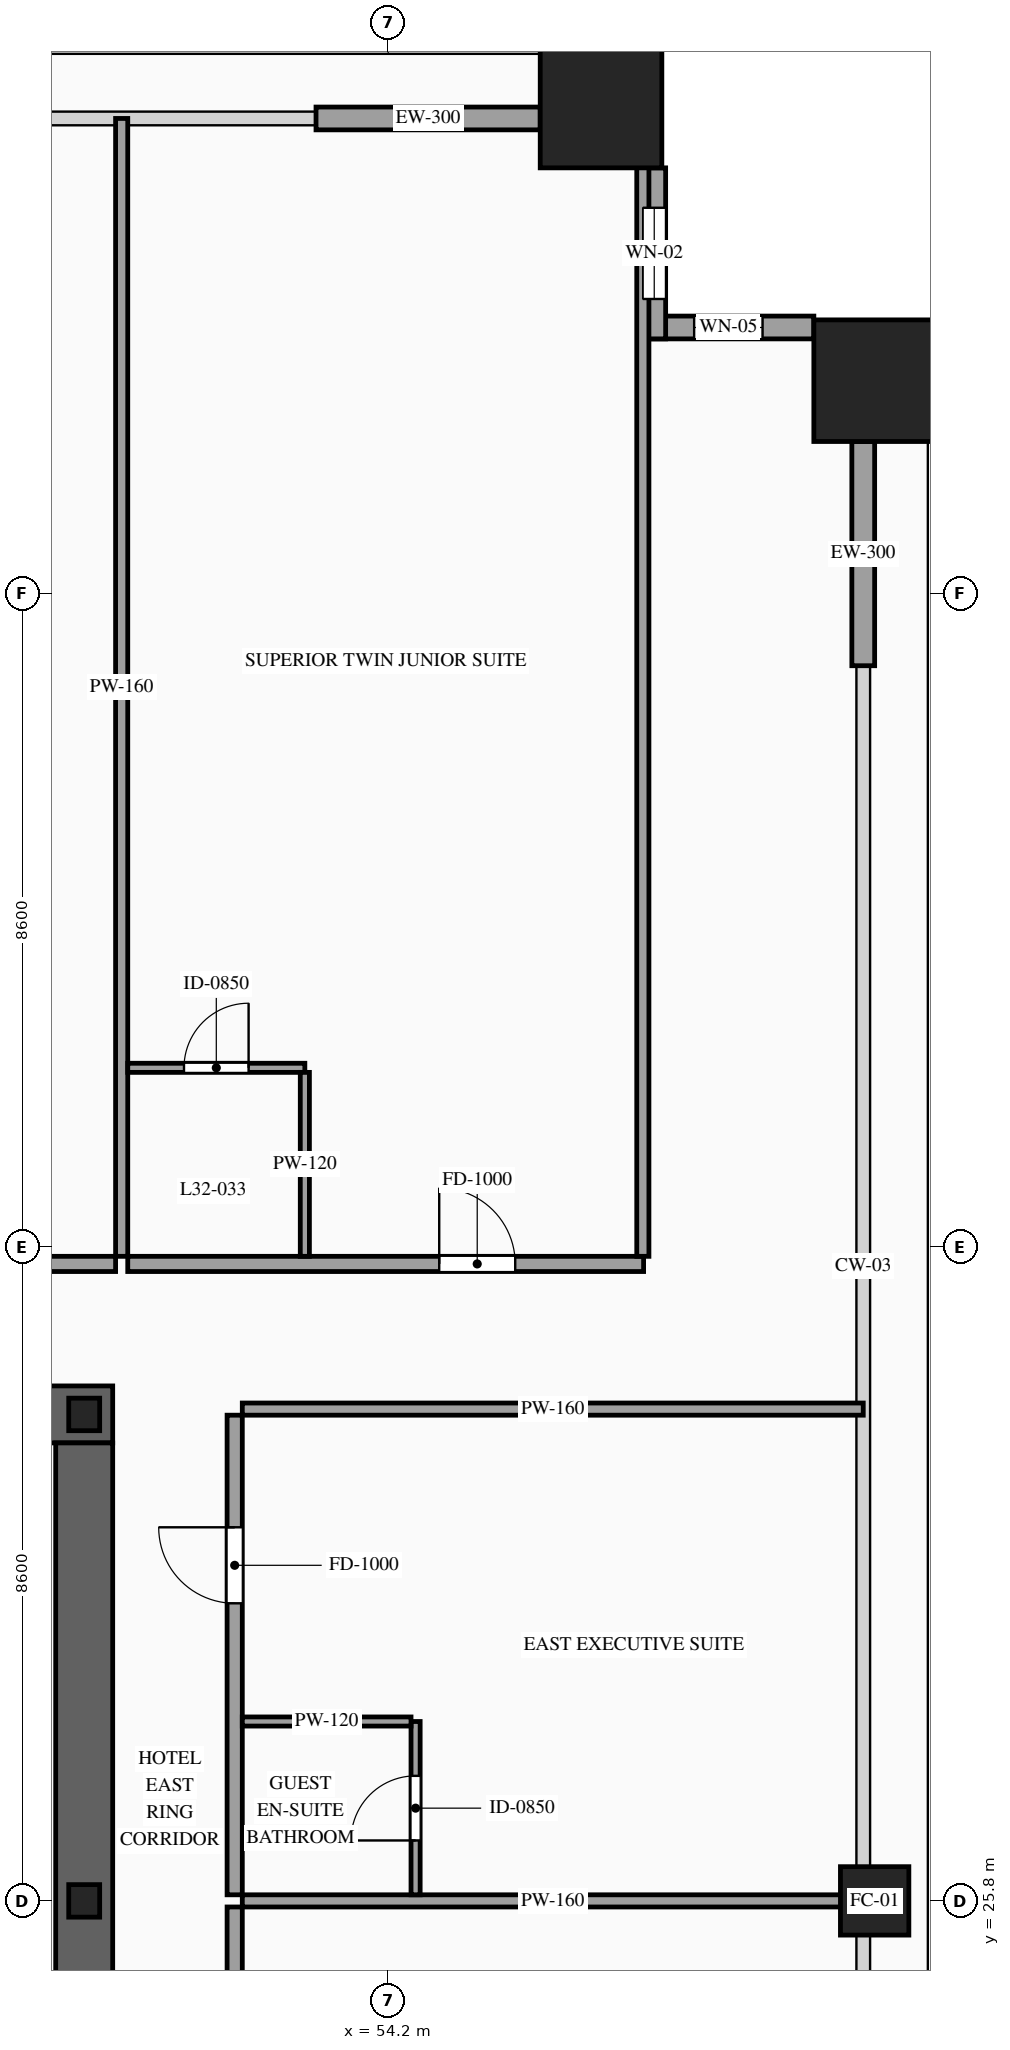
"""IFC4 building model, lengths in metres.
Left out: names, types, materials, properties, quantities, classifications, styles, units other than length and angle.
Written with IfcOpenShell. Run it as: python <this file> out.ifc"""

import sys

from ifc_helpers import new_model, si_unit, direction, frame, frame_2d, origin, origin_2d, place, context, subcontext, project, spatial, rectangle, hollow_rectangle, i_section, extrude, source, transform, mapped, element, fill, save


model = new_model("IFC4")
c1 = context("Model", 3, precision=1e-05, world=origin(), true_north=direction((0.0, 1.0)))
c2 = subcontext(c1, "Body", "Model", "MODEL_VIEW")
j1 = project(units=[si_unit("LENGTHUNIT", "METRE"), si_unit("PLANEANGLEUNIT", "RADIAN")], contexts=[c1])
p1 = place(None, origin())
s1 = spatial("IfcSite", under=j1, at=p1, CompositionType="ELEMENT")
p2 = place(p1, origin())
s2 = spatial("IfcBuilding", under=s1, at=p2, CompositionType="ELEMENT")
p3 = place(p2, frame((0.0, 0.0, 122.6)))
s3 = spatial("IfcBuildingStorey", under=s2, at=p3, CompositionType="ELEMENT", Elevation=122.6)
p4 = place(p3, frame((23.425, 32.2, 0.0), z_axis=(0.0, 0.0, 1.0), x_axis=(1.0, 0.0, 0.0)))
e1 = element("IfcWall", 1, at=p4, inside=s3, PredefinedType="SHEAR", context=c2, shape_type="SweptSolid", body=[
    extrude(rectangle(XDim=27.15, YDim=0.75, at=frame_2d((13.575, 0.0))), origin(), (0.0, 0.0, 1.0), 3.6),
])
p5 = place(p4, frame((4.645, 0.0, 0.0)))
e2 = element("IfcOpeningElement", 2, at=p5, cuts=e1, PredefinedType="OPENING", context=c2, shape_type="SweptSolid", body=[
    extrude(rectangle(XDim=0.9, YDim=2.15, at=frame_2d((0.45, 1.075))), frame((0.0, 0.39, 0.0), z_axis=(0.0, -1.0, 0.0), x_axis=(1.0, 0.0, 0.0)), (0.0, 0.0, 1.0), 0.78),
])
p6 = place(p4, frame((9.925, 0.0, 0.0)))
e3 = element("IfcOpeningElement", 3, at=p6, cuts=e1, PredefinedType="OPENING", context=c2, shape_type="SweptSolid", body=[
    extrude(rectangle(XDim=1.1, YDim=2.2, at=frame_2d((0.55, 1.1))), frame((0.0, 0.39, 0.0), z_axis=(0.0, -1.0, 0.0), x_axis=(1.0, 0.0, 0.0)), (0.0, 0.0, 1.0), 0.78),
])
p7 = place(p4, frame((15.775, 0.0, 0.0)))
e4 = element("IfcOpeningElement", 4, at=p7, cuts=e1, PredefinedType="OPENING", context=c2, shape_type="SweptSolid", body=[
    extrude(rectangle(XDim=1.1, YDim=2.2, at=frame_2d((0.55, 1.1))), frame((0.0, 0.39, 0.0), z_axis=(0.0, -1.0, 0.0), x_axis=(1.0, 0.0, 0.0)), (0.0, 0.0, 1.0), 0.78),
])
m1 = source(origin(), c2, "Body", "SweptSolid", [
    extrude(rectangle(XDim=12.05, YDim=0.75, at=frame_2d((6.025, 0.0))), origin(), (0.0, 0.0, 1.0), 3.6),
])
p8 = place(p3, frame((50.2, 19.775, 0.0), z_axis=(0.0, 0.0, 1.0), x_axis=(0.0, 1.0, 0.0)))
e5 = element("IfcWall", 5, at=p8, inside=s3, PredefinedType="SHEAR", context=c2, shape_type="MappedRepresentation", body=[
    mapped(m1, transform((0.0, 0.0, 0.0), scale=1.0)),
])
m2 = source(origin(), c2, "Body", "SweptSolid", [
    extrude(i_section(OverallWidth=0.407, OverallDepth=0.428, WebThickness=0.02, FlangeThickness=0.035, at=origin_2d()), origin(), (0.0, 0.0, 1.0), 3.6),
])
for number, where, z_axis, x_axis in (
    (6, (50.2, 25.8, 0.0), (0.0, 0.0, 1.0), (1.0, 0.0, 0.0)),
    (7, (50.2, 32.2, 0.0), (0.0, 0.0, 1.0), (1.0, 0.0, 0.0)),
):
    element("IfcColumn", number, at=place(p3, frame(where, z_axis=z_axis, x_axis=x_axis)), inside=s3, PredefinedType="COLUMN", context=c2, shape_type="MappedRepresentation", body=[
        mapped(m2, transform((0.0, 0.0, 0.0), scale=1.0)),
    ])
m3 = source(origin(), c2, "Body", "SweptSolid", [
    extrude(hollow_rectangle(XDim=1.6, YDim=1.6, WallThickness=0.07, at=origin_2d()), origin(), (0.0, 0.0, 1.0), 3.6),
])
p9 = place(p3, frame((57.0, 49.4, 0.0), z_axis=(0.0, 0.0, 1.0), x_axis=(1.0, 0.0, 0.0)))
e8 = element("IfcColumn", 8, at=p9, inside=s3, PredefinedType="COLUMN", context=c2, shape_type="MappedRepresentation", body=[
    mapped(m3, transform((0.0, 0.0, 0.0), scale=1.0)),
])
m4 = source(origin(), c2, "Body", "SweptSolid", [
    extrude(hollow_rectangle(XDim=0.9, YDim=0.9, WallThickness=0.042, at=origin_2d()), origin(), (0.0, 0.0, 1.0), 3.6),
])
p10 = place(p3, frame((60.6, 25.8, 0.0), z_axis=(0.0, 0.0, 1.0), x_axis=(1.0, 0.0, 0.0)))
e9 = element("IfcColumn", 9, at=p10, inside=s3, PredefinedType="COLUMN", context=c2, shape_type="MappedRepresentation", body=[
    mapped(m4, transform((0.0, 0.0, 0.0), scale=1.0)),
])
p11 = place(p3, frame((60.6, 45.8, 0.0), z_axis=(0.0, 0.0, 1.0), x_axis=(1.0, 0.0, 0.0)))
e10 = element("IfcColumn", 10, at=p11, inside=s3, PredefinedType="COLUMN", context=c2, shape_type="MappedRepresentation", body=[
    mapped(m3, transform((0.0, 0.0, 0.0), scale=1.0)),
])
p12 = place(p3, frame((59.8, 46.5, 0.0), z_axis=(0.0, 0.0, 1.0), x_axis=(-1.0, 0.0, 0.0)))
e11 = element("IfcWall", 11, at=p12, inside=s3, PredefinedType="SOLIDWALL", context=c2, shape_type="SweptSolid", body=[
    extrude(rectangle(XDim=2.25, YDim=0.3, at=frame_2d((1.125, 0.0))), origin(), (0.0, 0.0, 1.0), 3.38),
])
p13 = place(p12, frame((0.675, 0.0, 0.85)))
e12 = element("IfcOpeningElement", 12, at=p13, cuts=e11, PredefinedType="OPENING", context=c2, shape_type="SweptSolid", body=[
    extrude(rectangle(XDim=0.9, YDim=1.5, at=frame_2d((0.45, 0.75))), frame((0.0, 0.165, 0.0), z_axis=(0.0, -1.0, 0.0), x_axis=(1.0, 0.0, 0.0)), (0.0, 0.0, 1.0), 0.33),
])
p14 = place(p3, frame((57.7, 46.35, 0.0), z_axis=(0.0, 0.0, 1.0), x_axis=(0.0, 1.0, 0.0)))
e13 = element("IfcWall", 13, at=p14, inside=s3, PredefinedType="SOLIDWALL", context=c2, shape_type="SweptSolid", body=[
    extrude(rectangle(XDim=2.25, YDim=0.3, at=frame_2d((1.125, 0.0))), origin(), (0.0, 0.0, 1.0), 3.38),
])
p15 = place(p14, frame((0.525, 0.0, 0.85)))
e14 = element("IfcOpeningElement", 14, at=p15, cuts=e13, PredefinedType="OPENING", context=c2, shape_type="SweptSolid", body=[
    extrude(rectangle(XDim=1.2, YDim=2.1, at=frame_2d((0.6, 1.05))), frame((0.0, 0.165, 0.0), z_axis=(0.0, -1.0, 0.0), x_axis=(1.0, 0.0, 0.0)), (0.0, 0.0, 1.0), 0.33),
])
m5 = source(origin(), c2, "Body", "SweptSolid", [
    extrude(rectangle(XDim=2.95, YDim=0.3, at=frame_2d((1.475, 0.0))), origin(), (0.0, 0.0, 1.0), 2.775),
])
for number, where, z_axis, x_axis in (
    (15, (53.25, 49.25, 0.0), (0.0, 0.0, 1.0), (1.0, 0.0, 0.0)),
    (16, (60.45, 42.05, 0.0), (0.0, 0.0, 1.0), (0.0, 1.0, 0.0)),
):
    element("IfcWall", number, at=place(p3, frame(where, z_axis=z_axis, x_axis=x_axis)), inside=s3, PredefinedType="SOLIDWALL", context=c2, shape_type="MappedRepresentation", body=[
        mapped(m5, transform((0.0, 0.0, 0.0), scale=1.0)),
    ])
p16 = place(p3, frame((38.93, 34.18, 0.0), z_axis=(0.0, 0.0, 1.0), x_axis=(1.0, 0.0, 0.0)))
e17 = element("IfcWall", 17, at=p16, inside=s3, PredefinedType="PARTITIONING", context=c2, shape_type="SweptSolid", body=[
    extrude(rectangle(XDim=11.683, YDim=0.2, at=frame_2d((5.842, 0.0))), origin(), (0.0, 0.0, 1.0), 3.38),
])
p17 = place(p16, frame((6.547, 0.0, 0.0)))
e18 = element("IfcOpeningElement", 18, at=p17, cuts=e17, PredefinedType="OPENING", context=c2, shape_type="SweptSolid", body=[
    extrude(rectangle(XDim=1.0, YDim=2.2, at=frame_2d((0.5, 1.1))), frame((0.0, 0.115, 0.0), z_axis=(0.0, -1.0, 0.0), x_axis=(1.0, 0.0, 0.0)), (0.0, 0.0, 1.0), 0.23),
])
m6 = source(origin(), c2, "Body", "SweptSolid", [
    extrude(rectangle(XDim=14.97, YDim=0.16, at=frame_2d((7.485, 0.0))), origin(), (0.0, 0.0, 1.0), 3.38),
])
p18 = place(p3, frame((50.693, 34.28, 0.0), z_axis=(0.0, 0.0, 1.0), x_axis=(0.0, 1.0, 0.0)))
e19 = element("IfcWall", 19, at=p18, inside=s3, PredefinedType="PARTITIONING", context=c2, shape_type="MappedRepresentation", body=[
    mapped(m6, transform((0.0, 0.0, 0.0), scale=1.0)),
])
p19 = place(p3, frame((50.773, 34.18, 0.0), z_axis=(0.0, 0.0, 1.0), x_axis=(1.0, 0.0, 0.0)))
e20 = element("IfcWall", 20, at=p19, inside=s3, PredefinedType="PARTITIONING", context=c2, shape_type="SweptSolid", body=[
    extrude(rectangle(XDim=6.787, YDim=0.2, at=frame_2d((3.394, 0.0))), origin(), (0.0, 0.0, 1.0), 3.38),
])
p20 = place(p19, frame((4.098, 0.0, 0.0)))
e21 = element("IfcOpeningElement", 21, at=p20, cuts=e20, PredefinedType="OPENING", context=c2, shape_type="SweptSolid", body=[
    extrude(rectangle(XDim=1.0, YDim=2.2, at=frame_2d((0.5, 1.1))), frame((0.0, 0.115, 0.0), z_axis=(0.0, -1.0, 0.0), x_axis=(1.0, 0.0, 0.0)), (0.0, 0.0, 1.0), 0.23),
])
m7 = source(origin(), c2, "Body", "SweptSolid", [
    extrude(rectangle(XDim=14.82, YDim=0.16, at=frame_2d((7.41, 0.0))), origin(), (0.0, 0.0, 1.0), 3.38),
])
p21 = place(p3, frame((57.55, 34.28, 0.0), z_axis=(0.0, 0.0, 1.0), x_axis=(0.0, 1.0, 0.0)))
e22 = element("IfcWall", 22, at=p21, inside=s3, PredefinedType="PARTITIONING", context=c2, shape_type="MappedRepresentation", body=[
    mapped(m7, transform((0.0, 0.0, 0.0), scale=1.0)),
])
p22 = place(p3, frame((50.773, 36.76, 0.0), z_axis=(0.0, 0.0, 1.0), x_axis=(1.0, 0.0, 0.0)))
e23 = element("IfcWall", 23, at=p22, inside=s3, PredefinedType="PARTITIONING", context=c2, shape_type="SweptSolid", body=[
    extrude(rectangle(XDim=2.33, YDim=0.12, at=frame_2d((1.165, 0.0))), origin(), (0.0, 0.0, 1.0), 3.38),
])
p23 = place(p22, frame((0.74, 0.0, 0.0)))
e24 = element("IfcOpeningElement", 24, at=p23, cuts=e23, PredefinedType="OPENING", context=c2, shape_type="SweptSolid", body=[
    extrude(rectangle(XDim=0.85, YDim=2.1, at=frame_2d((0.425, 1.05))), frame((0.0, 0.075, 0.0), z_axis=(0.0, -1.0, 0.0), x_axis=(1.0, 0.0, 0.0)), (0.0, 0.0, 1.0), 0.15),
])
m8 = source(origin(), c2, "Body", "SweptSolid", [
    extrude(rectangle(XDim=2.42, YDim=0.12, at=frame_2d((1.21, 0.0))), origin(), (0.0, 0.0, 1.0), 3.38),
])
p24 = place(p3, frame((53.103, 34.28, 0.0), z_axis=(0.0, 0.0, 1.0), x_axis=(0.0, 1.0, 0.0)))
e25 = element("IfcWall", 25, at=p24, inside=s3, PredefinedType="PARTITIONING", context=c2, shape_type="MappedRepresentation", body=[
    mapped(m8, transform((0.0, 0.0, 0.0), scale=1.0)),
])
p25 = place(p3, frame((52.18, 19.41, 0.0), z_axis=(0.0, 0.0, 1.0), x_axis=(0.0, 1.0, 0.0)))
e26 = element("IfcWall", 26, at=p25, inside=s3, PredefinedType="PARTITIONING", context=c2, shape_type="SweptSolid", body=[
    extrude(rectangle(XDim=6.31, YDim=0.2, at=frame_2d((3.155, 0.0))), origin(), (0.0, 0.0, 1.0), 3.38),
])
p26 = place(p25, frame((3.835, 0.0, 0.0)))
e27 = element("IfcOpeningElement", 27, at=p26, cuts=e26, PredefinedType="OPENING", context=c2, shape_type="SweptSolid", body=[
    extrude(rectangle(XDim=1.0, YDim=2.2, at=frame_2d((0.5, 1.1))), frame((0.0, 0.115, 0.0), z_axis=(0.0, -1.0, 0.0), x_axis=(1.0, 0.0, 0.0)), (0.0, 0.0, 1.0), 0.23),
])
m9 = source(origin(), c2, "Body", "SweptSolid", [
    extrude(rectangle(XDim=8.17, YDim=0.16, at=frame_2d((4.085, 0.0))), origin(), (0.0, 0.0, 1.0), 2.675),
])
p27 = place(p3, frame((52.28, 25.8, 0.0), z_axis=(0.0, 0.0, 1.0), x_axis=(1.0, 0.0, 0.0)))
e28 = element("IfcWall", 28, at=p27, inside=s3, PredefinedType="PARTITIONING", context=c2, shape_type="MappedRepresentation", body=[
    mapped(m9, transform((0.0, 0.0, 0.0), scale=1.0)),
])
p28 = place(p3, frame((52.18, 25.88, 0.0), z_axis=(0.0, 0.0, 1.0), x_axis=(0.0, 1.0, 0.0)))
e29 = element("IfcWall", 29, at=p28, inside=s3, PredefinedType="PARTITIONING", context=c2, shape_type="SweptSolid", body=[
    extrude(rectangle(XDim=6.31, YDim=0.2, at=frame_2d((3.155, 0.0))), origin(), (0.0, 0.0, 1.0), 3.38),
])
p29 = place(p28, frame((3.835, 0.0, 0.0)))
e30 = element("IfcOpeningElement", 30, at=p29, cuts=e29, PredefinedType="OPENING", context=c2, shape_type="SweptSolid", body=[
    extrude(rectangle(XDim=1.0, YDim=2.2, at=frame_2d((0.5, 1.1))), frame((0.0, 0.115, 0.0), z_axis=(0.0, -1.0, 0.0), x_axis=(1.0, 0.0, 0.0)), (0.0, 0.0, 1.0), 0.23),
])
m10 = source(origin(), c2, "Body", "SweptSolid", [
    extrude(rectangle(XDim=8.17, YDim=0.16, at=frame_2d((4.085, 0.0))), origin(), (0.0, 0.0, 1.0), 2.875),
])
p30 = place(p3, frame((52.28, 32.27, 0.0), z_axis=(0.0, 0.0, 1.0), x_axis=(1.0, 0.0, 0.0)))
e31 = element("IfcWall", 31, at=p30, inside=s3, PredefinedType="PARTITIONING", context=c2, shape_type="MappedRepresentation", body=[
    mapped(m10, transform((0.0, 0.0, 0.0), scale=1.0)),
])
p31 = place(p3, frame((54.56, 25.88, 0.0), z_axis=(0.0, 0.0, 1.0), x_axis=(0.0, 1.0, 0.0)))
e32 = element("IfcWall", 32, at=p31, inside=s3, PredefinedType="PARTITIONING", context=c2, shape_type="SweptSolid", body=[
    extrude(rectangle(XDim=2.28, YDim=0.12, at=frame_2d((1.14, 0.0))), origin(), (0.0, 0.0, 1.0), 3.38),
])
p32 = place(p31, frame((0.715, 0.0, 0.0)))
e33 = element("IfcOpeningElement", 33, at=p32, cuts=e32, PredefinedType="OPENING", context=c2, shape_type="SweptSolid", body=[
    extrude(rectangle(XDim=0.85, YDim=2.1, at=frame_2d((0.425, 1.05))), frame((0.0, 0.075, 0.0), z_axis=(0.0, -1.0, 0.0), x_axis=(1.0, 0.0, 0.0)), (0.0, 0.0, 1.0), 0.15),
])
m11 = source(origin(), c2, "Body", "SweptSolid", [
    extrude(rectangle(XDim=2.22, YDim=0.12, at=frame_2d((1.11, 0.0))), origin(), (0.0, 0.0, 1.0), 3.38),
])
p33 = place(p3, frame((52.28, 28.16, 0.0), z_axis=(0.0, 0.0, 1.0), x_axis=(1.0, 0.0, 0.0)))
e34 = element("IfcWall", 34, at=p33, inside=s3, PredefinedType="PARTITIONING", context=c2, shape_type="MappedRepresentation", body=[
    mapped(m11, transform((0.0, 0.0, 0.0), scale=1.0)),
])
m12 = source(origin(), c2, "Body", "SweptSolid", [
    extrude(rectangle(XDim=0.9, YDim=1.5, at=frame_2d((0.45, 0.75))), frame((0.0, 0.03, 0.0), z_axis=(0.0, -1.0, 0.0), x_axis=(1.0, 0.0, 0.0)), (0.0, 0.0, 1.0), 0.06),
])
p34 = place(p13, origin())
e35 = element("IfcWindow", 35, at=p34, inside=s3, PartitioningType="SINGLE_PANEL", PredefinedType="WINDOW", context=c2, shape_type="MappedRepresentation", body=[
    mapped(m12, transform((0.0, 0.0, 0.0), scale=1.0)),
])
fill(e12, e35)
m13 = source(origin(), c2, "Body", "SweptSolid", [
    extrude(rectangle(XDim=1.2, YDim=2.1, at=frame_2d((0.6, 1.05))), frame((0.0, 0.03, 0.0), z_axis=(0.0, -1.0, 0.0), x_axis=(1.0, 0.0, 0.0)), (0.0, 0.0, 1.0), 0.06),
])
p35 = place(p15, origin())
e36 = element("IfcWindow", 36, at=p35, inside=s3, PartitioningType="SINGLE_PANEL", PredefinedType="WINDOW", context=c2, shape_type="MappedRepresentation", body=[
    mapped(m13, transform((0.0, 0.0, 0.0), scale=1.0)),
])
fill(e14, e36)
m14 = source(origin(), c2, "Body", "SweptSolid", [
    extrude(rectangle(XDim=1.0, YDim=2.2, at=frame_2d((0.5, 1.1))), frame((0.0, 0.025, 0.0), z_axis=(0.0, -1.0, 0.0), x_axis=(1.0, 0.0, 0.0)), (0.0, 0.0, 1.0), 0.05),
])
p36 = place(p20, origin())
e37 = element("IfcDoor", 37, at=p36, inside=s3, OperationType="SINGLE_SWING_LEFT", PredefinedType="DOOR", context=c2, shape_type="MappedRepresentation", body=[
    mapped(m14, transform((0.0, 0.0, 0.0), scale=1.0)),
])
fill(e21, e37)
m15 = source(origin(), c2, "Body", "SweptSolid", [
    extrude(rectangle(XDim=0.85, YDim=2.1, at=frame_2d((0.425, 1.05))), frame((0.0, 0.025, 0.0), z_axis=(0.0, -1.0, 0.0), x_axis=(1.0, 0.0, 0.0)), (0.0, 0.0, 1.0), 0.05),
])
p37 = place(p23, origin())
e38 = element("IfcDoor", 38, at=p37, inside=s3, OperationType="SINGLE_SWING_RIGHT", PredefinedType="DOOR", context=c2, shape_type="MappedRepresentation", body=[
    mapped(m15, transform((0.0, 0.0, 0.0), scale=1.0)),
])
fill(e24, e38)
p38 = place(p29, origin())
e39 = element("IfcDoor", 39, at=p38, inside=s3, OperationType="SINGLE_SWING_RIGHT", PredefinedType="DOOR", context=c2, shape_type="MappedRepresentation", body=[
    mapped(m14, transform((0.0, 0.0, 0.0), scale=1.0)),
])
fill(e30, e39)
p39 = place(p32, origin())
e40 = element("IfcDoor", 40, at=p39, inside=s3, OperationType="SINGLE_SWING_LEFT", PredefinedType="DOOR", context=c2, shape_type="MappedRepresentation", body=[
    mapped(m15, transform((0.0, 0.0, 0.0), scale=1.0)),
])
fill(e33, e40)
save(model, sys.argv[1])
